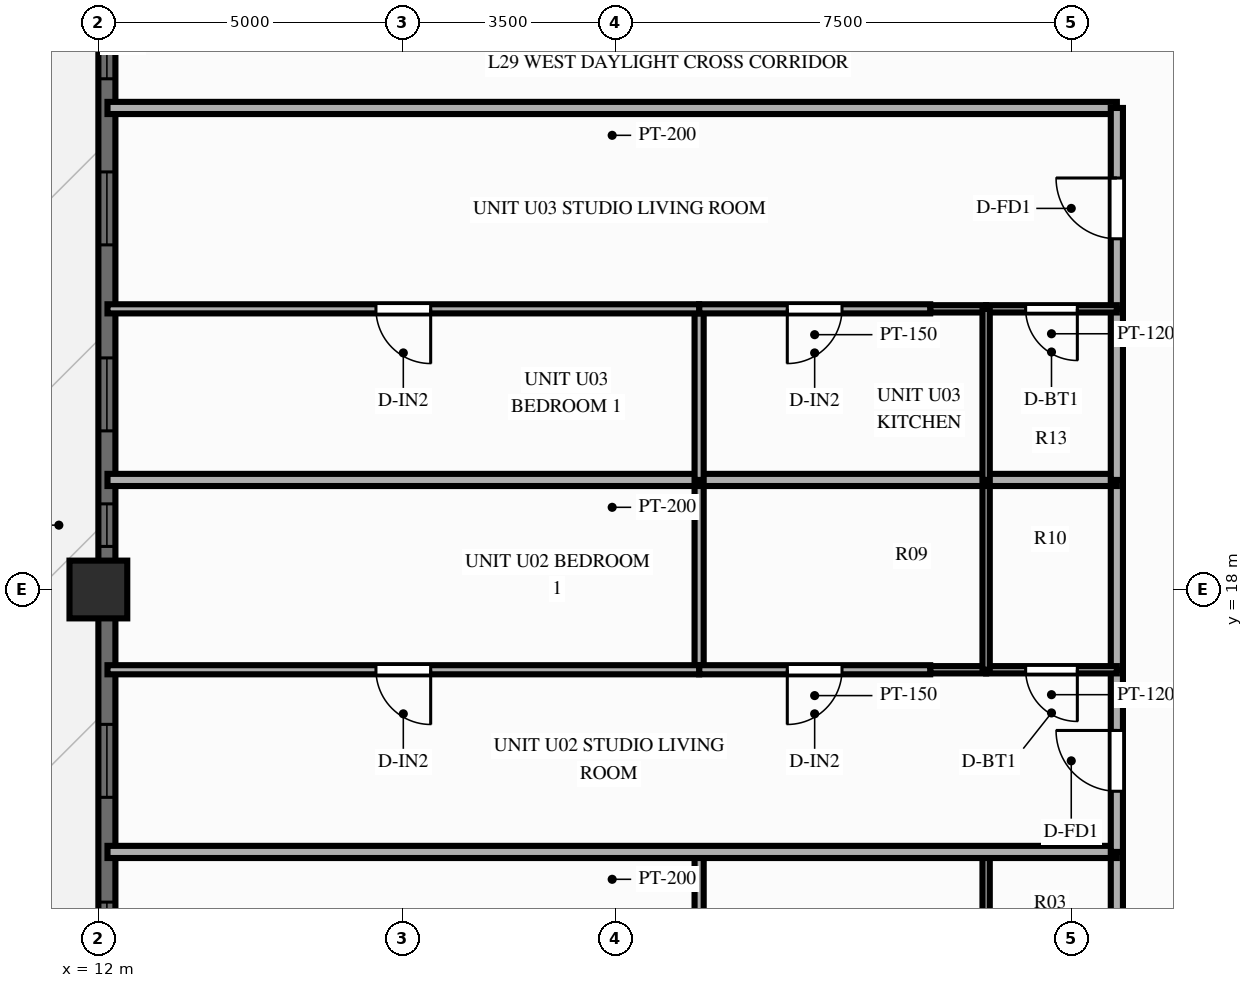
"""IFC4 building model, lengths in metres.
Left out: names, types, materials, properties, quantities, classifications, styles, units other than length and angle.
Written with IfcOpenShell. Run it as: python <this file> out.ifc"""

import sys

from ifc_helpers import new_model, si_unit, direction, frame, frame_2d, origin, origin_2d, place, context, subcontext, project, spatial, rectangle, extrude, source, transform, mapped, element, fill, save


model = new_model("IFC4")
c1 = context("Model", 3, precision=1e-05, world=origin(), true_north=direction((0.0, 1.0)))
c2 = subcontext(c1, "Body", "Model", "MODEL_VIEW")
j1 = project(units=[si_unit("LENGTHUNIT", "METRE"), si_unit("PLANEANGLEUNIT", "RADIAN")], contexts=[c1])
p1 = place(None, origin())
s1 = spatial("IfcSite", under=j1, at=p1, CompositionType="ELEMENT")
p2 = place(p1, origin())
s2 = spatial("IfcBuilding", under=s1, at=p2, CompositionType="ELEMENT")
p3 = place(p2, frame((0.0, 0.0, 92.85)))
s3 = spatial("IfcBuildingStorey", under=s2, at=p3, CompositionType="ELEMENT", Elevation=92.85)
m1 = source(origin(), c2, "Body", "SweptSolid", [
    extrude(rectangle(XDim=0.95, YDim=0.95, at=origin_2d()), origin(), (0.0, 0.0, 1.0), 3.0),
])
p4 = place(p3, frame((12.0, 18.0, 0.0), z_axis=(0.0, 0.0, 1.0), x_axis=(1.0, 0.0, 0.0)))
e1 = element("IfcColumn", 1, at=p4, inside=s3, PredefinedType="COLUMN", context=c2, shape_type="MappedRepresentation", body=[
    mapped(m1, transform((0.0, 0.0, 0.0), scale=1.0)),
])
p5 = place(p3, frame((12.14, 7.2, 0.0), z_axis=(0.0, 0.0, 1.0), x_axis=(0.0, 1.0, 0.0)))
e2 = element("IfcWall", 2, at=p5, inside=s3, PredefinedType="SOLIDWALL", context=c2, shape_type="SweptSolid", body=[
    extrude(rectangle(XDim=39.6, YDim=0.28, at=frame_2d((19.8, 0.0))), origin(), (0.0, 0.0, 1.0), 2.28),
])
p6 = place(p5, frame((1.374, 0.0, 0.25)))
e3 = element("IfcOpeningElement", 3, at=p6, cuts=e2, PredefinedType="OPENING", context=c2, shape_type="SweptSolid", body=[
    extrude(rectangle(XDim=1.2, YDim=1.5, at=frame_2d((0.6, 0.75))), frame((0.0, 0.152, 0.0), z_axis=(0.0, -1.0, 0.0), x_axis=(1.0, 0.0, 0.0)), (0.0, 0.0, 1.0), 0.304),
])
p7 = place(p5, frame((4.458, 0.0, 0.25)))
e4 = element("IfcOpeningElement", 4, at=p7, cuts=e2, PredefinedType="OPENING", context=c2, shape_type="SweptSolid", body=[
    extrude(rectangle(XDim=1.2, YDim=1.5, at=frame_2d((0.6, 0.75))), frame((0.0, 0.152, 0.0), z_axis=(0.0, -1.0, 0.0), x_axis=(1.0, 0.0, 0.0)), (0.0, 0.0, 1.0), 0.304),
])
p8 = place(p5, frame((7.382, 0.0, 0.25)))
e5 = element("IfcOpeningElement", 5, at=p8, cuts=e2, PredefinedType="OPENING", context=c2, shape_type="SweptSolid", body=[
    extrude(rectangle(XDim=1.2, YDim=1.5, at=frame_2d((0.6, 0.75))), frame((0.0, 0.152, 0.0), z_axis=(0.0, -1.0, 0.0), x_axis=(1.0, 0.0, 0.0)), (0.0, 0.0, 1.0), 0.304),
])
p9 = place(p5, frame((11.508, 0.0, 0.25)))
e6 = element("IfcOpeningElement", 6, at=p9, cuts=e2, PredefinedType="OPENING", context=c2, shape_type="SweptSolid", body=[
    extrude(rectangle(XDim=0.7, YDim=1.5, at=frame_2d((0.35, 0.75))), frame((0.0, 0.152, 0.0), z_axis=(0.0, -1.0, 0.0), x_axis=(1.0, 0.0, 0.0)), (0.0, 0.0, 1.0), 0.304),
])
p10 = place(p5, frame((13.409, 0.0, 0.25)))
e7 = element("IfcOpeningElement", 7, at=p10, cuts=e2, PredefinedType="OPENING", context=c2, shape_type="SweptSolid", body=[
    extrude(rectangle(XDim=1.2, YDim=1.5, at=frame_2d((0.6, 0.75))), frame((0.0, 0.152, 0.0), z_axis=(0.0, -1.0, 0.0), x_axis=(1.0, 0.0, 0.0)), (0.0, 0.0, 1.0), 0.304),
])
p11 = place(p5, frame((16.468, 0.0, 0.25)))
e8 = element("IfcOpeningElement", 8, at=p11, cuts=e2, PredefinedType="OPENING", context=c2, shape_type="SweptSolid", body=[
    extrude(rectangle(XDim=1.2, YDim=1.5, at=frame_2d((0.6, 0.75))), frame((0.0, 0.152, 0.0), z_axis=(0.0, -1.0, 0.0), x_axis=(1.0, 0.0, 0.0)), (0.0, 0.0, 1.0), 0.304),
])
p12 = place(p5, frame((19.2, 0.0, 0.25)))
e9 = element("IfcOpeningElement", 9, at=p12, cuts=e2, PredefinedType="OPENING", context=c2, shape_type="SweptSolid", body=[
    extrude(rectangle(XDim=1.2, YDim=1.5, at=frame_2d((0.6, 0.75))), frame((0.0, 0.152, 0.0), z_axis=(0.0, -1.0, 0.0), x_axis=(1.0, 0.0, 0.0)), (0.0, 0.0, 1.0), 0.304),
])
p13 = place(p5, frame((21.807, 0.0, 0.0)))
e10 = element("IfcOpeningElement", 10, at=p13, cuts=e2, PredefinedType="OPENING", context=c2, shape_type="SweptSolid", body=[
    extrude(rectangle(XDim=1.6, YDim=2.15, at=frame_2d((0.8, 1.075))), frame((0.0, 0.152, 0.0), z_axis=(0.0, -1.0, 0.0), x_axis=(1.0, 0.0, 0.0)), (0.0, 0.0, 1.0), 0.304),
])
p14 = place(p5, frame((25.159, 0.0, 0.25)))
e11 = element("IfcOpeningElement", 11, at=p14, cuts=e2, PredefinedType="OPENING", context=c2, shape_type="SweptSolid", body=[
    extrude(rectangle(XDim=1.2, YDim=1.5, at=frame_2d((0.6, 0.75))), frame((0.0, 0.152, 0.0), z_axis=(0.0, -1.0, 0.0), x_axis=(1.0, 0.0, 0.0)), (0.0, 0.0, 1.0), 0.304),
])
p15 = place(p5, frame((27.484, 0.0, 0.25)))
e12 = element("IfcOpeningElement", 12, at=p15, cuts=e2, PredefinedType="OPENING", context=c2, shape_type="SweptSolid", body=[
    extrude(rectangle(XDim=0.7, YDim=1.5, at=frame_2d((0.35, 0.75))), frame((0.0, 0.152, 0.0), z_axis=(0.0, -1.0, 0.0), x_axis=(1.0, 0.0, 0.0)), (0.0, 0.0, 1.0), 0.304),
])
p16 = place(p5, frame((31.111, 0.0, 0.25)))
e13 = element("IfcOpeningElement", 13, at=p16, cuts=e2, PredefinedType="OPENING", context=c2, shape_type="SweptSolid", body=[
    extrude(rectangle(XDim=1.2, YDim=1.5, at=frame_2d((0.6, 0.75))), frame((0.0, 0.152, 0.0), z_axis=(0.0, -1.0, 0.0), x_axis=(1.0, 0.0, 0.0)), (0.0, 0.0, 1.0), 0.304),
])
p17 = place(p5, frame((34.109, 0.0, 0.25)))
e14 = element("IfcOpeningElement", 14, at=p17, cuts=e2, PredefinedType="OPENING", context=c2, shape_type="SweptSolid", body=[
    extrude(rectangle(XDim=1.2, YDim=1.5, at=frame_2d((0.6, 0.75))), frame((0.0, 0.152, 0.0), z_axis=(0.0, -1.0, 0.0), x_axis=(1.0, 0.0, 0.0)), (0.0, 0.0, 1.0), 0.304),
])
p18 = place(p5, frame((37.101, 0.0, 0.25)))
e15 = element("IfcOpeningElement", 15, at=p18, cuts=e2, PredefinedType="OPENING", context=c2, shape_type="SweptSolid", body=[
    extrude(rectangle(XDim=1.2, YDim=1.5, at=frame_2d((0.6, 0.75))), frame((0.0, 0.152, 0.0), z_axis=(0.0, -1.0, 0.0), x_axis=(1.0, 0.0, 0.0)), (0.0, 0.0, 1.0), 0.304),
])
p19 = place(p3, frame((28.75, 25.92, 0.0), z_axis=(0.0, 0.0, 1.0), x_axis=(-1.0, 0.0, 0.0)))
e16 = element("IfcWall", 16, at=p19, inside=s3, PredefinedType="PARTITIONING", context=c2, shape_type="SweptSolid", body=[
    extrude(rectangle(XDim=16.6, YDim=0.2, at=frame_2d((8.3, 0.0))), origin(), (0.0, 0.0, 1.0), 2.79),
])
p20 = place(p3, frame((28.75, 10.833, 0.0), z_axis=(0.0, 0.0, 1.0), x_axis=(0.0, 1.0, 0.0)))
e17 = element("IfcWall", 17, at=p20, inside=s3, PredefinedType="PARTITIONING", context=c2, shape_type="SweptSolid", body=[
    extrude(rectangle(XDim=2.85, YDim=0.2, at=frame_2d((1.425, 0.0))), origin(), (0.0, 0.0, 1.0), 2.79),
])
p21 = place(p3, frame((26.6, 10.833, 0.0), z_axis=(0.0, 0.0, 1.0), x_axis=(0.0, 1.0, 0.0)))
e18 = element("IfcWall", 18, at=p21, inside=s3, PredefinedType="PARTITIONING", context=c2, shape_type="SweptSolid", body=[
    extrude(rectangle(XDim=2.85, YDim=0.12, at=frame_2d((1.425, 0.0))), origin(), (0.0, 0.0, 1.0), 2.79),
])
p22 = place(p3, frame((21.88, 10.833, 0.0), z_axis=(0.0, 0.0, 1.0), x_axis=(0.0, 1.0, 0.0)))
e19 = element("IfcWall", 19, at=p22, inside=s3, PredefinedType="PARTITIONING", context=c2, shape_type="SweptSolid", body=[
    extrude(rectangle(XDim=2.85, YDim=0.15, at=frame_2d((1.425, 0.0))), origin(), (0.0, 0.0, 1.0), 2.79),
])
p23 = place(p3, frame((28.75, 13.684, 0.0), z_axis=(0.0, 0.0, 1.0), x_axis=(-1.0, 0.0, 0.0)))
e20 = element("IfcWall", 20, at=p23, inside=s3, PredefinedType="PARTITIONING", context=c2, shape_type="SweptSolid", body=[
    extrude(rectangle(XDim=16.6, YDim=0.2, at=frame_2d((8.3, 0.0))), origin(), (0.0, 0.0, 1.0), 2.79),
])
p24 = place(p3, frame((28.75, 13.684, 0.0), z_axis=(0.0, 0.0, 1.0), x_axis=(0.0, 1.0, 0.0)))
e21 = element("IfcWall", 21, at=p24, inside=s3, PredefinedType="PARTITIONING", context=c2, shape_type="SweptSolid", body=[
    extrude(rectangle(XDim=2.996, YDim=0.2, at=frame_2d((1.498, 0.0))), origin(), (0.0, 0.0, 1.0), 2.79),
])
p25 = place(p24, frame((0.998, 0.0, 0.0)))
e22 = element("IfcOpeningElement", 22, at=p25, cuts=e21, PredefinedType="OPENING", context=c2, shape_type="SweptSolid", body=[
    extrude(rectangle(XDim=1.0, YDim=2.15, at=frame_2d((0.5, 1.075))), frame((0.0, 0.112, 0.0), z_axis=(0.0, -1.0, 0.0), x_axis=(1.0, 0.0, 0.0)), (0.0, 0.0, 1.0), 0.224),
])
p26 = place(p3, frame((28.75, 16.68, 0.0), z_axis=(0.0, 0.0, 1.0), x_axis=(0.0, 1.0, 0.0)))
e23 = element("IfcWall", 23, at=p26, inside=s3, PredefinedType="PARTITIONING", context=c2, shape_type="SweptSolid", body=[
    extrude(rectangle(XDim=3.122, YDim=0.2, at=frame_2d((1.561, 0.0))), origin(), (0.0, 0.0, 1.0), 2.79),
])
p27 = place(p3, frame((28.75, 16.68, 0.0), z_axis=(0.0, 0.0, 1.0), x_axis=(-1.0, 0.0, 0.0)))
e24 = element("IfcWall", 24, at=p27, inside=s3, PredefinedType="PARTITIONING", context=c2, shape_type="SweptSolid", body=[
    extrude(rectangle(XDim=2.15, YDim=0.12, at=frame_2d((1.075, 0.0))), origin(), (0.0, 0.0, 1.0), 2.79),
])
p28 = place(p27, frame((0.65, 0.0, 0.0)))
e25 = element("IfcOpeningElement", 25, at=p28, cuts=e24, PredefinedType="OPENING", context=c2, shape_type="SweptSolid", body=[
    extrude(rectangle(XDim=0.85, YDim=2.05, at=frame_2d((0.425, 1.025))), frame((0.0, 0.072, 0.0), z_axis=(0.0, -1.0, 0.0), x_axis=(1.0, 0.0, 0.0)), (0.0, 0.0, 1.0), 0.144),
])
p29 = place(p3, frame((26.6, 16.68, 0.0), z_axis=(0.0, 0.0, 1.0), x_axis=(-1.0, 0.0, 0.0)))
e26 = element("IfcWall", 26, at=p29, inside=s3, PredefinedType="PARTITIONING", context=c2, shape_type="SweptSolid", body=[
    extrude(rectangle(XDim=0.92, YDim=0.12, at=frame_2d((0.46, 0.0))), origin(), (0.0, 0.0, 1.0), 2.79),
])
p30 = place(p3, frame((26.6, 16.68, 0.0), z_axis=(0.0, 0.0, 1.0), x_axis=(0.0, 1.0, 0.0)))
e27 = element("IfcWall", 27, at=p30, inside=s3, PredefinedType="PARTITIONING", context=c2, shape_type="SweptSolid", body=[
    extrude(rectangle(XDim=3.122, YDim=0.12, at=frame_2d((1.561, 0.0))), origin(), (0.0, 0.0, 1.0), 2.79),
])
p31 = place(p3, frame((21.88, 16.68, 0.0), z_axis=(0.0, 0.0, 1.0), x_axis=(0.0, 1.0, 0.0)))
e28 = element("IfcWall", 28, at=p31, inside=s3, PredefinedType="PARTITIONING", context=c2, shape_type="SweptSolid", body=[
    extrude(rectangle(XDim=3.122, YDim=0.15, at=frame_2d((1.561, 0.0))), origin(), (0.0, 0.0, 1.0), 2.49),
])
p32 = place(p3, frame((25.68, 16.68, 0.0), z_axis=(0.0, 0.0, 1.0), x_axis=(-1.0, 0.0, 0.0)))
e29 = element("IfcWall", 29, at=p32, inside=s3, PredefinedType="PARTITIONING", context=c2, shape_type="SweptSolid", body=[
    extrude(rectangle(XDim=3.8, YDim=0.15, at=frame_2d((1.9, 0.0))), origin(), (0.0, 0.0, 1.0), 2.79),
])
p33 = place(p32, frame((1.45, 0.0, 0.0)))
e30 = element("IfcOpeningElement", 30, at=p33, cuts=e29, PredefinedType="OPENING", context=c2, shape_type="SweptSolid", body=[
    extrude(rectangle(XDim=0.9, YDim=2.1, at=frame_2d((0.45, 1.05))), frame((0.0, 0.087, 0.0), z_axis=(0.0, -1.0, 0.0), x_axis=(1.0, 0.0, 0.0)), (0.0, 0.0, 1.0), 0.174),
])
p34 = place(p3, frame((21.88, 16.68, 0.0), z_axis=(0.0, 0.0, 1.0), x_axis=(-1.0, 0.0, 0.0)))
e31 = element("IfcWall", 31, at=p34, inside=s3, PredefinedType="PARTITIONING", context=c2, shape_type="SweptSolid", body=[
    extrude(rectangle(XDim=9.73, YDim=0.15, at=frame_2d((4.865, 0.0))), origin(), (0.0, 0.0, 1.0), 2.79),
])
p35 = place(p34, frame((4.415, 0.0, 0.0)))
e32 = element("IfcOpeningElement", 32, at=p35, cuts=e31, PredefinedType="OPENING", context=c2, shape_type="SweptSolid", body=[
    extrude(rectangle(XDim=0.9, YDim=2.1, at=frame_2d((0.45, 1.05))), frame((0.0, 0.087, 0.0), z_axis=(0.0, -1.0, 0.0), x_axis=(1.0, 0.0, 0.0)), (0.0, 0.0, 1.0), 0.174),
])
p36 = place(p3, frame((28.75, 19.802, 0.0), z_axis=(0.0, 0.0, 1.0), x_axis=(-1.0, 0.0, 0.0)))
e33 = element("IfcWall", 33, at=p36, inside=s3, PredefinedType="PARTITIONING", context=c2, shape_type="SweptSolid", body=[
    extrude(rectangle(XDim=16.6, YDim=0.2, at=frame_2d((8.3, 0.0))), origin(), (0.0, 0.0, 1.0), 2.79),
])
p37 = place(p3, frame((28.75, 19.802, 0.0), z_axis=(0.0, 0.0, 1.0), x_axis=(0.0, 1.0, 0.0)))
e34 = element("IfcWall", 34, at=p37, inside=s3, PredefinedType="PARTITIONING", context=c2, shape_type="SweptSolid", body=[
    extrude(rectangle(XDim=2.814, YDim=0.2, at=frame_2d((1.407, 0.0))), origin(), (0.0, 0.0, 1.0), 2.79),
])
p38 = place(p3, frame((28.75, 22.616, 0.0), z_axis=(0.0, 0.0, 1.0), x_axis=(0.0, 1.0, 0.0)))
e35 = element("IfcWall", 35, at=p38, inside=s3, PredefinedType="PARTITIONING", context=c2, shape_type="SweptSolid", body=[
    extrude(rectangle(XDim=3.304, YDim=0.2, at=frame_2d((1.652, 0.0))), origin(), (0.0, 0.0, 1.0), 2.79),
])
p39 = place(p38, frame((1.152, 0.0, 0.0)))
e36 = element("IfcOpeningElement", 36, at=p39, cuts=e35, PredefinedType="OPENING", context=c2, shape_type="SweptSolid", body=[
    extrude(rectangle(XDim=1.0, YDim=2.15, at=frame_2d((0.5, 1.075))), frame((0.0, 0.112, 0.0), z_axis=(0.0, -1.0, 0.0), x_axis=(1.0, 0.0, 0.0)), (0.0, 0.0, 1.0), 0.224),
])
p40 = place(p3, frame((28.75, 22.616, 0.0), z_axis=(0.0, 0.0, 1.0), x_axis=(-1.0, 0.0, 0.0)))
e37 = element("IfcWall", 37, at=p40, inside=s3, PredefinedType="PARTITIONING", context=c2, shape_type="SweptSolid", body=[
    extrude(rectangle(XDim=2.15, YDim=0.12, at=frame_2d((1.075, 0.0))), origin(), (0.0, 0.0, 1.0), 2.79),
])
p41 = place(p40, frame((0.65, 0.0, 0.0)))
e38 = element("IfcOpeningElement", 38, at=p41, cuts=e37, PredefinedType="OPENING", context=c2, shape_type="SweptSolid", body=[
    extrude(rectangle(XDim=0.85, YDim=2.05, at=frame_2d((0.425, 1.025))), frame((0.0, 0.072, 0.0), z_axis=(0.0, -1.0, 0.0), x_axis=(1.0, 0.0, 0.0)), (0.0, 0.0, 1.0), 0.144),
])
p42 = place(p3, frame((26.6, 22.616, 0.0), z_axis=(0.0, 0.0, 1.0), x_axis=(-1.0, 0.0, 0.0)))
e39 = element("IfcWall", 39, at=p42, inside=s3, PredefinedType="PARTITIONING", context=c2, shape_type="SweptSolid", body=[
    extrude(rectangle(XDim=0.92, YDim=0.12, at=frame_2d((0.46, 0.0))), origin(), (0.0, 0.0, 1.0), 2.79),
])
p43 = place(p3, frame((26.6, 19.802, 0.0), z_axis=(0.0, 0.0, 1.0), x_axis=(0.0, 1.0, 0.0)))
e40 = element("IfcWall", 40, at=p43, inside=s3, PredefinedType="PARTITIONING", context=c2, shape_type="SweptSolid", body=[
    extrude(rectangle(XDim=2.814, YDim=0.12, at=frame_2d((1.407, 0.0))), origin(), (0.0, 0.0, 1.0), 2.79),
])
p44 = place(p3, frame((21.88, 19.802, 0.0), z_axis=(0.0, 0.0, 1.0), x_axis=(0.0, 1.0, 0.0)))
e41 = element("IfcWall", 41, at=p44, inside=s3, PredefinedType="PARTITIONING", context=c2, shape_type="SweptSolid", body=[
    extrude(rectangle(XDim=2.814, YDim=0.15, at=frame_2d((1.407, 0.0))), origin(), (0.0, 0.0, 1.0), 2.49),
])
p45 = place(p3, frame((25.68, 22.616, 0.0), z_axis=(0.0, 0.0, 1.0), x_axis=(-1.0, 0.0, 0.0)))
e42 = element("IfcWall", 42, at=p45, inside=s3, PredefinedType="PARTITIONING", context=c2, shape_type="SweptSolid", body=[
    extrude(rectangle(XDim=3.8, YDim=0.15, at=frame_2d((1.9, 0.0))), origin(), (0.0, 0.0, 1.0), 2.79),
])
p46 = place(p45, frame((1.45, 0.0, 0.0)))
e43 = element("IfcOpeningElement", 43, at=p46, cuts=e42, PredefinedType="OPENING", context=c2, shape_type="SweptSolid", body=[
    extrude(rectangle(XDim=0.9, YDim=2.1, at=frame_2d((0.45, 1.05))), frame((0.0, 0.087, 0.0), z_axis=(0.0, -1.0, 0.0), x_axis=(1.0, 0.0, 0.0)), (0.0, 0.0, 1.0), 0.174),
])
p47 = place(p3, frame((21.88, 22.616, 0.0), z_axis=(0.0, 0.0, 1.0), x_axis=(-1.0, 0.0, 0.0)))
e44 = element("IfcWall", 44, at=p47, inside=s3, PredefinedType="PARTITIONING", context=c2, shape_type="SweptSolid", body=[
    extrude(rectangle(XDim=9.73, YDim=0.15, at=frame_2d((4.865, 0.0))), origin(), (0.0, 0.0, 1.0), 2.79),
])
p48 = place(p47, frame((4.415, 0.0, 0.0)))
e45 = element("IfcOpeningElement", 45, at=p48, cuts=e44, PredefinedType="OPENING", context=c2, shape_type="SweptSolid", body=[
    extrude(rectangle(XDim=0.9, YDim=2.1, at=frame_2d((0.45, 1.05))), frame((0.0, 0.087, 0.0), z_axis=(0.0, -1.0, 0.0), x_axis=(1.0, 0.0, 0.0)), (0.0, 0.0, 1.0), 0.174),
])
m2 = source(origin(), c2, "Body", "SweptSolid", [
    extrude(rectangle(XDim=1.2, YDim=1.5, at=frame_2d((0.6, 0.75))), frame((0.0, 0.03, 0.0), z_axis=(0.0, -1.0, 0.0), x_axis=(1.0, 0.0, 0.0)), (0.0, 0.0, 1.0), 0.06),
])
p49 = place(p7, origin())
e46 = element("IfcWindow", 46, at=p49, inside=s3, PartitioningType="SINGLE_PANEL", PredefinedType="WINDOW", context=c2, shape_type="MappedRepresentation", body=[
    mapped(m2, transform((0.0, 0.0, 0.0), scale=1.0)),
])
fill(e4, e46)
p50 = place(p8, origin())
e47 = element("IfcWindow", 47, at=p50, inside=s3, PartitioningType="SINGLE_PANEL", PredefinedType="WINDOW", context=c2, shape_type="MappedRepresentation", body=[
    mapped(m2, transform((0.0, 0.0, 0.0), scale=1.0)),
])
fill(e5, e47)
m3 = source(origin(), c2, "Body", "SweptSolid", [
    extrude(rectangle(XDim=0.7, YDim=1.5, at=frame_2d((0.35, 0.75))), frame((0.0, 0.03, 0.0), z_axis=(0.0, -1.0, 0.0), x_axis=(1.0, 0.0, 0.0)), (0.0, 0.0, 1.0), 0.06),
])
p51 = place(p9, origin())
e48 = element("IfcWindow", 48, at=p51, inside=s3, PartitioningType="SINGLE_PANEL", PredefinedType="WINDOW", context=c2, shape_type="MappedRepresentation", body=[
    mapped(m3, transform((0.0, 0.0, 0.0), scale=1.0)),
])
fill(e6, e48)
p52 = place(p10, origin())
e49 = element("IfcWindow", 49, at=p52, inside=s3, PartitioningType="SINGLE_PANEL", PredefinedType="WINDOW", context=c2, shape_type="MappedRepresentation", body=[
    mapped(m2, transform((0.0, 0.0, 0.0), scale=1.0)),
])
fill(e7, e49)
p53 = place(p11, origin())
e50 = element("IfcWindow", 50, at=p53, inside=s3, PartitioningType="SINGLE_PANEL", PredefinedType="WINDOW", context=c2, shape_type="MappedRepresentation", body=[
    mapped(m2, transform((0.0, 0.0, 0.0), scale=1.0)),
])
fill(e8, e50)
p54 = place(p12, origin())
e51 = element("IfcWindow", 51, at=p54, inside=s3, PartitioningType="SINGLE_PANEL", PredefinedType="WINDOW", context=c2, shape_type="MappedRepresentation", body=[
    mapped(m2, transform((0.0, 0.0, 0.0), scale=1.0)),
])
fill(e9, e51)
m4 = source(origin(), c2, "Body", "SweptSolid", [
    extrude(rectangle(XDim=1.0, YDim=2.15, at=frame_2d((0.5, 1.075))), frame((0.0, 0.025, 0.0), z_axis=(0.0, -1.0, 0.0), x_axis=(1.0, 0.0, 0.0)), (0.0, 0.0, 1.0), 0.05),
])
p55 = place(p25, origin())
e52 = element("IfcDoor", 52, at=p55, inside=s3, OperationType="SINGLE_SWING_RIGHT", PredefinedType="DOOR", context=c2, shape_type="MappedRepresentation", body=[
    mapped(m4, transform((0.0, 0.0, 0.0), scale=1.0)),
])
fill(e22, e52)
m5 = source(origin(), c2, "Body", "SweptSolid", [
    extrude(rectangle(XDim=0.85, YDim=2.05, at=frame_2d((0.425, 1.025))), frame((0.0, 0.025, 0.0), z_axis=(0.0, -1.0, 0.0), x_axis=(1.0, 0.0, 0.0)), (0.0, 0.0, 1.0), 0.05),
])
p56 = place(p28, origin())
e53 = element("IfcDoor", 53, at=p56, inside=s3, OperationType="SINGLE_SWING_LEFT", PredefinedType="DOOR", context=c2, shape_type="MappedRepresentation", body=[
    mapped(m5, transform((0.0, 0.0, 0.0), scale=1.0)),
])
fill(e25, e53)
m6 = source(origin(), c2, "Body", "SweptSolid", [
    extrude(rectangle(XDim=0.9, YDim=2.1, at=frame_2d((0.45, 1.05))), frame((0.0, 0.025, 0.0), z_axis=(0.0, -1.0, 0.0), x_axis=(1.0, 0.0, 0.0)), (0.0, 0.0, 1.0), 0.05),
])
p57 = place(p33, origin())
e54 = element("IfcDoor", 54, at=p57, inside=s3, OperationType="SINGLE_SWING_RIGHT", PredefinedType="DOOR", context=c2, shape_type="MappedRepresentation", body=[
    mapped(m6, transform((0.0, 0.0, 0.0), scale=1.0)),
])
fill(e30, e54)
p58 = place(p35, origin())
e55 = element("IfcDoor", 55, at=p58, inside=s3, OperationType="SINGLE_SWING_LEFT", PredefinedType="DOOR", context=c2, shape_type="MappedRepresentation", body=[
    mapped(m6, transform((0.0, 0.0, 0.0), scale=1.0)),
])
fill(e32, e55)
p59 = place(p39, origin())
e56 = element("IfcDoor", 56, at=p59, inside=s3, OperationType="SINGLE_SWING_RIGHT", PredefinedType="DOOR", context=c2, shape_type="MappedRepresentation", body=[
    mapped(m4, transform((0.0, 0.0, 0.0), scale=1.0)),
])
fill(e36, e56)
p60 = place(p41, origin())
e57 = element("IfcDoor", 57, at=p60, inside=s3, OperationType="SINGLE_SWING_LEFT", PredefinedType="DOOR", context=c2, shape_type="MappedRepresentation", body=[
    mapped(m5, transform((0.0, 0.0, 0.0), scale=1.0)),
])
fill(e38, e57)
p61 = place(p46, origin())
e58 = element("IfcDoor", 58, at=p61, inside=s3, OperationType="SINGLE_SWING_RIGHT", PredefinedType="DOOR", context=c2, shape_type="MappedRepresentation", body=[
    mapped(m6, transform((0.0, 0.0, 0.0), scale=1.0)),
])
fill(e43, e58)
p62 = place(p48, origin())
e59 = element("IfcDoor", 59, at=p62, inside=s3, OperationType="SINGLE_SWING_LEFT", PredefinedType="DOOR", context=c2, shape_type="MappedRepresentation", body=[
    mapped(m6, transform((0.0, 0.0, 0.0), scale=1.0)),
])
fill(e45, e59)
save(model, sys.argv[1])
